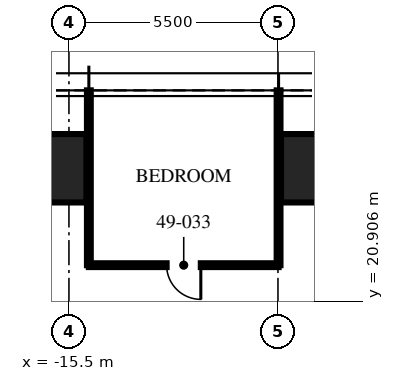
"""IFC4 building model, lengths in metres.
Left out: names, types, materials, properties, quantities, classifications, styles, units other than length and angle.
Written with IfcOpenShell. Run it as: python <this file> out.ifc"""

import sys

from ifc_helpers import new_model, si_unit, direction, frame, frame_2d, origin, origin_2d, place, context, subcontext, project, spatial, rectangle, hollow_rectangle, extrude, element, fill, save


model = new_model("IFC4")
c1 = context("Model", 3, precision=1e-05, world=origin(), true_north=direction((0.0, 1.0)))
c2 = subcontext(c1, "Body", "Model", "MODEL_VIEW")
j1 = project(units=[si_unit("LENGTHUNIT", "METRE"), si_unit("PLANEANGLEUNIT", "RADIAN")], contexts=[c1])
p1 = place(None, origin())
s1 = spatial("IfcSite", under=j1, at=p1, CompositionType="ELEMENT")
p2 = place(p1, origin())
s2 = spatial("IfcBuilding", under=s1, at=p2, CompositionType="ELEMENT")
p3 = place(p2, frame((0.0, 0.0, 199.5)))
s3 = spatial("IfcBuildingStorey", under=s2, at=p3, CompositionType="ELEMENT", Elevation=199.5)
p4 = place(p3, frame((-16.64, 24.4, 0.08), z_axis=(0.0, 0.0, 1.0), x_axis=(1.0, 0.0, 0.0)))
e1 = element("IfcColumn", 1, at=p4, inside=s3, PredefinedType="COLUMN", context=c2, shape_type="SweptSolid", body=[
    extrude(hollow_rectangle(XDim=3.2, YDim=1.8, WallThickness=0.2, at=origin_2d()), origin(), (0.0, 0.0, 1.0), 3.67),
])
p5 = place(p3, frame((-8.32, 24.4, -0.07), z_axis=(0.0, 0.0, 1.0), x_axis=(1.0, 0.0, 0.0)))
e2 = element("IfcColumn", 2, at=p5, inside=s3, PredefinedType="COLUMN", context=c2, shape_type="SweptSolid", body=[
    extrude(hollow_rectangle(XDim=3.2, YDim=1.8, WallThickness=0.2, at=origin_2d()), origin(), (0.0, 0.0, 1.0), 3.82),
])
for number, where, z_axis, x_axis in (
    (3, (-9.984, 21.85, 0.0), (0.0, 0.0, 1.0), (0.0, 1.0, 0.0)),
    (4, (-14.976, 21.85, 0.0), (0.0, 0.0, 1.0), (0.0, 1.0, 0.0)),
):
    element("IfcWall", number, at=place(p3, frame(where, z_axis=z_axis, x_axis=x_axis)), inside=s3, PredefinedType="PARTITIONING", context=c2, shape_type="SweptSolid", body=[
        extrude(rectangle(XDim=4.6, YDim=0.1, at=frame_2d((2.3, 0.0))), origin(), (0.0, 0.0, 1.0), 2.91),
    ])
p6 = place(p3, frame((-9.984, 21.85, 0.0), z_axis=(0.0, 0.0, 1.0), x_axis=(-1.0, 0.0, 0.0)))
e5 = element("IfcWall", 5, at=p6, inside=s3, PredefinedType="PARTITIONING", context=c2, shape_type="SweptSolid", body=[
    extrude(rectangle(XDim=4.992, YDim=0.1, at=frame_2d((2.496, 0.0))), origin(), (0.0, 0.0, 1.0), 2.81),
])
p7 = place(p6, frame((2.046, 0.0, 0.0)))
e6 = element("IfcOpeningElement", 6, at=p7, cuts=e5, PredefinedType="OPENING", context=c2, shape_type="SweptSolid", body=[
    extrude(rectangle(XDim=0.9, YDim=2.1, at=frame_2d((0.45, 1.05))), frame((0.0, 0.06, 0.0), z_axis=(0.0, -1.0, 0.0), x_axis=(1.0, 0.0, 0.0)), (0.0, 0.0, 1.0), 0.12),
])
p8 = place(p7, origin())
e7 = element("IfcDoor", 7, at=p8, inside=s3, OperationType="SINGLE_SWING_LEFT", PredefinedType="DOOR", context=c2, shape_type="SweptSolid", body=[
    extrude(rectangle(XDim=0.9, YDim=2.1, at=frame_2d((0.45, 1.05))), frame((0.0, 0.025, 0.0), z_axis=(0.0, -1.0, 0.0), x_axis=(1.0, 0.0, 0.0)), (0.0, 0.0, 1.0), 0.05),
])
fill(e6, e7)
save(model, sys.argv[1])
